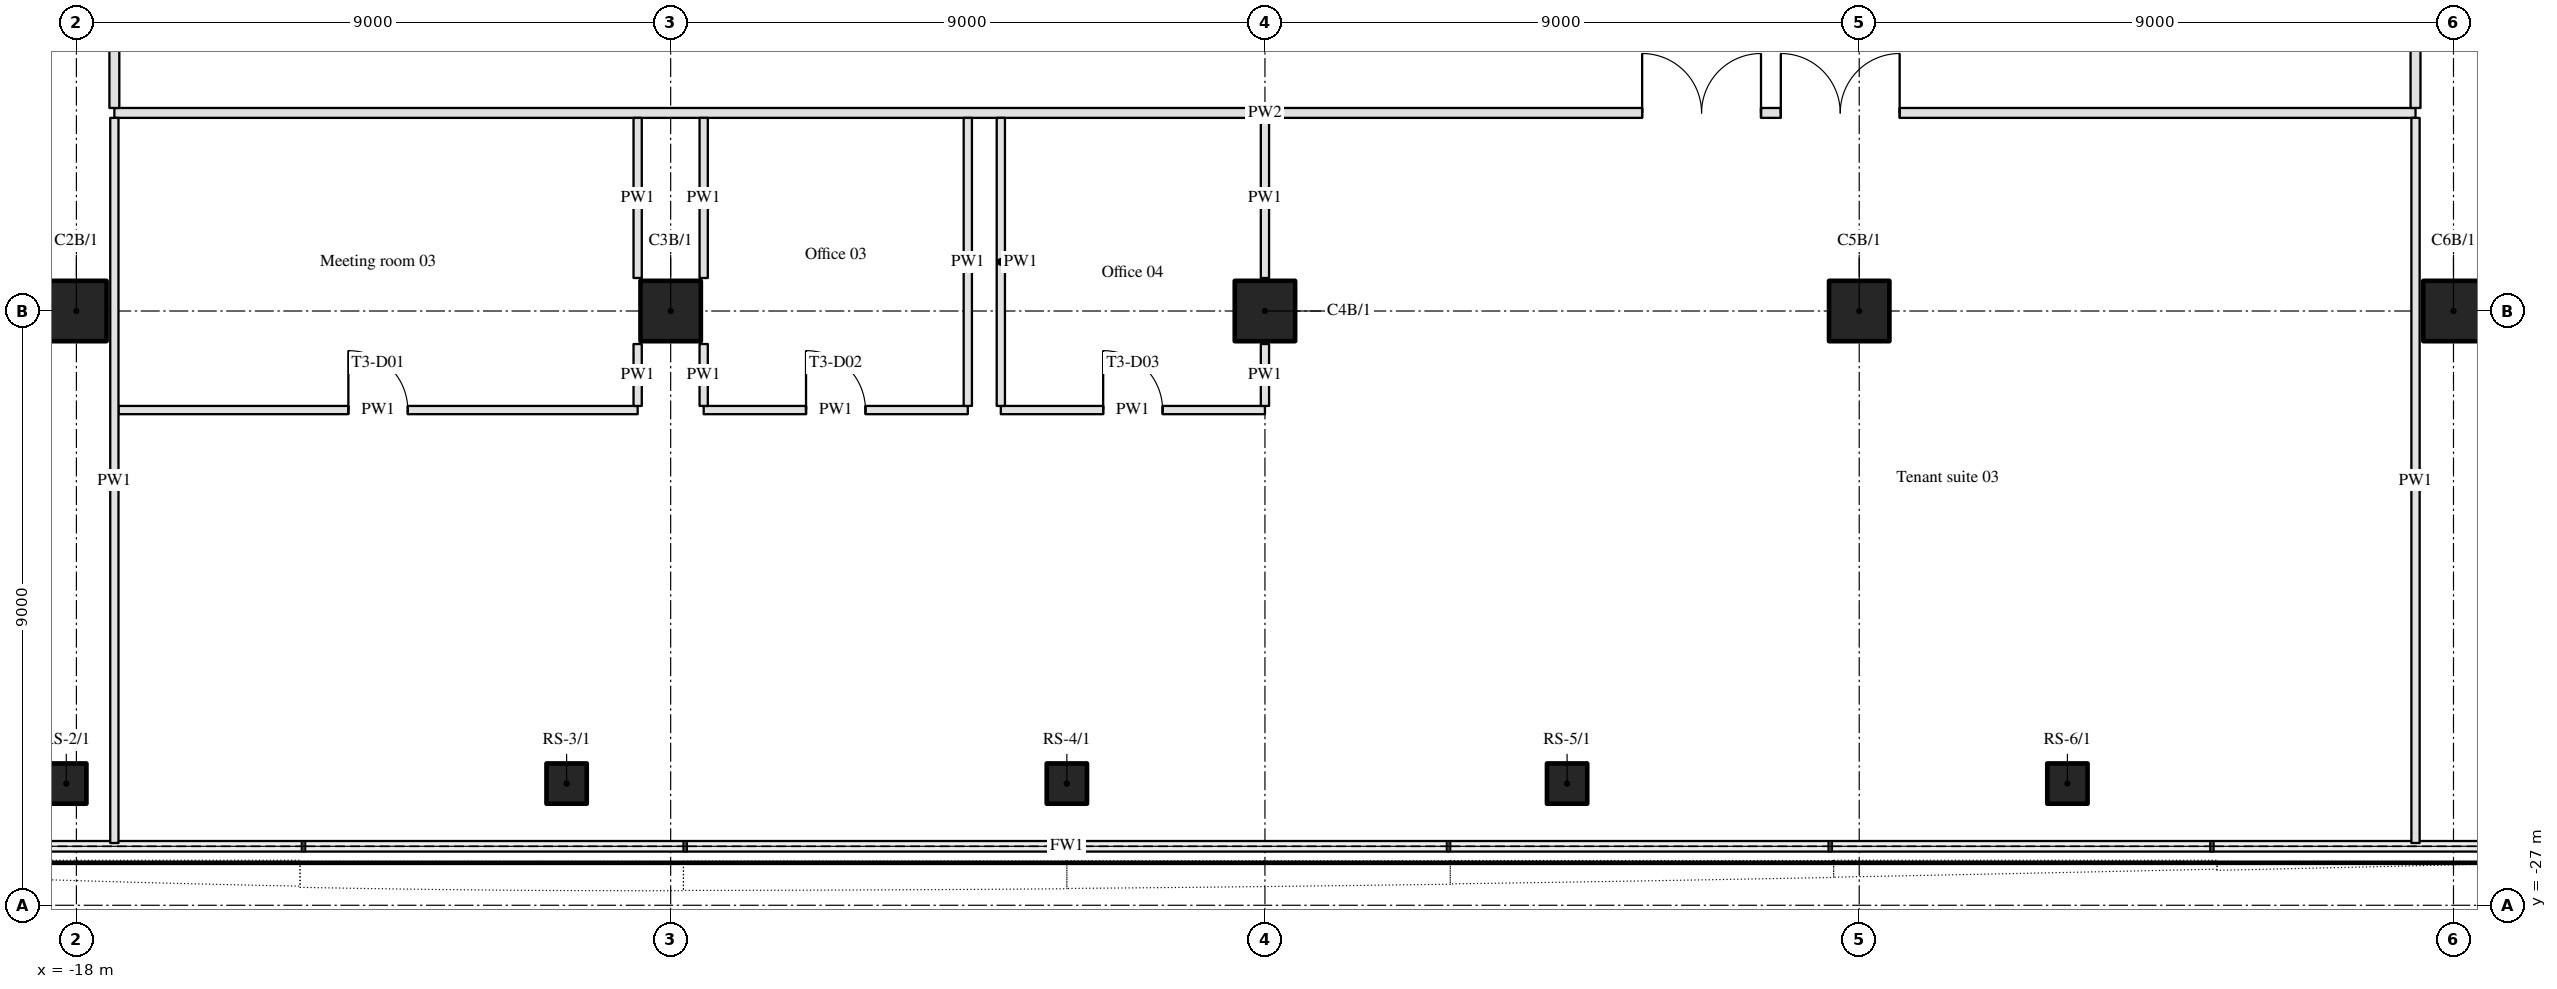
"""IFC4 building model, lengths in metres.
Left out: names, types, materials, properties, quantities, classifications, styles, units other than length and angle.
Written with IfcOpenShell. Run it as: python <this file> out.ifc"""

import sys

from ifc_helpers import new_model, si_unit, direction, frame, frame_2d, origin, origin_2d, place, context, subcontext, project, spatial, rectangle, hollow_circle, extrude, element, fill, save


model = new_model("IFC4")
c1 = context("Model", 3, precision=1e-05, world=origin(), true_north=direction((0.0, 1.0)))
c2 = subcontext(c1, "Body", "Model", "MODEL_VIEW")
j1 = project(units=[si_unit("LENGTHUNIT", "METRE"), si_unit("PLANEANGLEUNIT", "RADIAN")], contexts=[c1])
p1 = place(None, origin())
s1 = spatial("IfcSite", under=j1, at=p1, CompositionType="ELEMENT")
p2 = place(p1, origin())
s2 = spatial("IfcBuilding", under=s1, at=p2, CompositionType="ELEMENT")
p3 = place(p2, frame((0.0, 0.0, 53.7)))
s3 = spatial("IfcBuildingStorey", under=s2, at=p3, CompositionType="ELEMENT", Elevation=53.7)
for number, where, z_axis, x_axis in (
    (1, (-18.0, -18.0, 0.0), (0.0, 0.0, 1.0), (1.0, 0.0, 0.0)),
    (2, (-9.0, -18.0, 0.0), (0.0, 0.0, 1.0), (1.0, 0.0, 0.0)),
    (3, (0.0, -18.0, 0.0), (0.0, 0.0, 1.0), (1.0, 0.0, 0.0)),
    (4, (9.0, -18.0, 0.0), (0.0, 0.0, 1.0), (1.0, 0.0, 0.0)),
    (5, (18.0, -18.0, 0.0), (0.0, 0.0, 1.0), (1.0, 0.0, 0.0)),
):
    element("IfcColumn", number, at=place(p3, frame(where, z_axis=z_axis, x_axis=x_axis)), inside=s3, PredefinedType="COLUMN", context=c2, shape_type="SweptSolid", body=[
        extrude(hollow_circle(Radius=0.457, WallThickness=0.05, at=origin_2d()), origin(), (0.0, 0.0, 1.0), 3.9),
    ])
for number, where, z_axis, x_axis in (
    (6, (-18.153, -25.157, 0.0), (0.0, 0.0, 1.0), (1.0, 0.0, 0.0)),
    (7, (-10.576, -25.157, 0.0), (0.0, 0.0, 1.0), (1.0, 0.0, 0.0)),
    (8, (-3.0, -25.157, 0.0), (0.0, 0.0, 1.0), (1.0, 0.0, 0.0)),
    (9, (4.576, -25.157, 0.0), (0.0, 0.0, 1.0), (1.0, 0.0, 0.0)),
    (10, (12.153, -25.157, 0.0), (0.0, 0.0, 1.0), (1.0, 0.0, 0.0)),
):
    element("IfcColumn", number, at=place(p3, frame(where, z_axis=z_axis, x_axis=x_axis)), inside=s3, PredefinedType="COLUMN", context=c2, shape_type="SweptSolid", body=[
        extrude(hollow_circle(Radius=0.305, WallThickness=0.03, at=origin_2d()), origin(), (0.0, 0.0, 1.0), 3.9),
    ])
p4 = place(p3, frame((-17.363, -19.5, 0.0), z_axis=(0.0, 0.0, 1.0), x_axis=(1.0, 0.0, 0.0)))
e11 = element("IfcWall", 11, at=p4, inside=s3, PredefinedType="PARTITIONING", context=c2, shape_type="SweptSolid", body=[
    extrude(rectangle(XDim=7.863, YDim=0.125, at=frame_2d((3.931, 0.0))), origin(), (0.0, 0.0, 1.0), 2.96),
])
p5 = place(p4, frame((3.481, 0.0, 0.0)))
e12 = element("IfcOpeningElement", 12, at=p5, cuts=e11, PredefinedType="OPENING", context=c2, shape_type="SweptSolid", body=[
    extrude(rectangle(XDim=0.9, YDim=2.1, at=frame_2d((0.45, 1.05))), frame((0.0, 0.073, 0.0), z_axis=(0.0, -1.0, 0.0), x_axis=(1.0, 0.0, 0.0)), (0.0, 0.0, 1.0), 0.145),
])
p6 = place(p3, frame((-8.5, -19.5, 0.0), z_axis=(0.0, 0.0, 1.0), x_axis=(1.0, 0.0, 0.0)))
e13 = element("IfcWall", 13, at=p6, inside=s3, PredefinedType="PARTITIONING", context=c2, shape_type="SweptSolid", body=[
    extrude(rectangle(XDim=4.0, YDim=0.125, at=frame_2d((2.0, 0.0))), origin(), (0.0, 0.0, 1.0), 2.96),
])
p7 = place(p6, frame((1.55, 0.0, 0.0)))
e14 = element("IfcOpeningElement", 14, at=p7, cuts=e13, PredefinedType="OPENING", context=c2, shape_type="SweptSolid", body=[
    extrude(rectangle(XDim=0.9, YDim=2.1, at=frame_2d((0.45, 1.05))), frame((0.0, 0.073, 0.0), z_axis=(0.0, -1.0, 0.0), x_axis=(1.0, 0.0, 0.0)), (0.0, 0.0, 1.0), 0.145),
])
p8 = place(p3, frame((-4.0, -19.5, 0.0), z_axis=(0.0, 0.0, 1.0), x_axis=(1.0, 0.0, 0.0)))
e15 = element("IfcWall", 15, at=p8, inside=s3, PredefinedType="PARTITIONING", context=c2, shape_type="SweptSolid", body=[
    extrude(rectangle(XDim=4.0, YDim=0.125, at=frame_2d((2.0, 0.0))), origin(), (0.0, 0.0, 1.0), 2.96),
])
p9 = place(p8, frame((1.55, 0.0, 0.0)))
e16 = element("IfcOpeningElement", 16, at=p9, cuts=e15, PredefinedType="OPENING", context=c2, shape_type="SweptSolid", body=[
    extrude(rectangle(XDim=0.9, YDim=2.1, at=frame_2d((0.45, 1.05))), frame((0.0, 0.073, 0.0), z_axis=(0.0, -1.0, 0.0), x_axis=(1.0, 0.0, 0.0)), (0.0, 0.0, 1.0), 0.145),
])
p10 = place(p3, frame((-17.425, -15.0, 0.0), z_axis=(0.0, 0.0, 1.0), x_axis=(1.0, 0.0, 0.0)))
e17 = element("IfcWall", 17, at=p10, inside=s3, PredefinedType="PARTITIONING", context=c2, shape_type="SweptSolid", body=[
    extrude(rectangle(XDim=34.85, YDim=0.15, at=frame_2d((17.425, 0.0))), origin(), (0.0, 0.0, 1.0), 2.96),
])
p11 = place(p10, frame((25.238, 0.0, 0.0)))
e18 = element("IfcOpeningElement", 18, at=p11, cuts=e17, PredefinedType="OPENING", context=c2, shape_type="SweptSolid", body=[
    extrude(rectangle(XDim=1.8, YDim=2.1, at=frame_2d((0.9, 1.05))), frame((0.0, 0.085, 0.0), z_axis=(0.0, -1.0, 0.0), x_axis=(1.0, 0.0, 0.0)), (0.0, 0.0, 1.0), 0.17),
])
p12 = place(p10, frame((23.137, 0.0, 0.0)))
e19 = element("IfcOpeningElement", 19, at=p12, cuts=e17, PredefinedType="OPENING", context=c2, shape_type="SweptSolid", body=[
    extrude(rectangle(XDim=1.8, YDim=2.1, at=frame_2d((0.9, 1.05))), frame((0.0, 0.085, 0.0), z_axis=(0.0, -1.0, 0.0), x_axis=(1.0, 0.0, 0.0)), (0.0, 0.0, 1.0), 0.17),
])
p13 = place(p3, frame((-17.425, -26.057, 0.0), z_axis=(0.0, 0.0, 1.0), x_axis=(0.0, 1.0, 0.0)))
e20 = element("IfcWall", 20, at=p13, inside=s3, PredefinedType="PARTITIONING", context=c2, shape_type="SweptSolid", body=[
    extrude(rectangle(XDim=10.982, YDim=0.125, at=frame_2d((5.491, 0.0))), origin(), (0.0, 0.0, 1.0), 2.96),
])
p14 = place(p3, frame((-17.425, 5.925, 0.0), z_axis=(0.0, 0.0, 1.0), x_axis=(0.0, -1.0, 0.0)))
e21 = element("IfcWall", 21, at=p14, inside=s3, PredefinedType="PARTITIONING", context=c2, shape_type="SweptSolid", body=[
    extrude(rectangle(XDim=20.85, YDim=0.15, at=frame_2d((10.425, 0.0))), origin(), (0.0, 0.0, 1.0), 2.96),
])
p15 = place(p14, frame((16.988, 0.0, 0.0)))
e22 = element("IfcOpeningElement", 22, at=p15, cuts=e21, PredefinedType="OPENING", context=c2, shape_type="SweptSolid", body=[
    extrude(rectangle(XDim=1.8, YDim=2.1, at=frame_2d((0.9, 1.05))), frame((0.0, 0.085, 0.0), z_axis=(0.0, -1.0, 0.0), x_axis=(1.0, 0.0, 0.0)), (0.0, 0.0, 1.0), 0.17),
])
p16 = place(p14, frame((6.562, 0.0, 0.0)))
e23 = element("IfcOpeningElement", 23, at=p16, cuts=e21, PredefinedType="OPENING", context=c2, shape_type="SweptSolid", body=[
    extrude(rectangle(XDim=1.8, YDim=2.1, at=frame_2d((0.9, 1.05))), frame((0.0, 0.085, 0.0), z_axis=(0.0, -1.0, 0.0), x_axis=(1.0, 0.0, 0.0)), (0.0, 0.0, 1.0), 0.17),
])
p17 = place(p14, frame((8.663, 0.0, 0.0)))
e24 = element("IfcOpeningElement", 24, at=p17, cuts=e21, PredefinedType="OPENING", context=c2, shape_type="SweptSolid", body=[
    extrude(rectangle(XDim=1.8, YDim=2.1, at=frame_2d((0.9, 1.05))), frame((0.0, 0.085, 0.0), z_axis=(0.0, -1.0, 0.0), x_axis=(1.0, 0.0, 0.0)), (0.0, 0.0, 1.0), 0.17),
])
p18 = place(p3, frame((-9.5, -19.438, 0.0), z_axis=(0.0, 0.0, 1.0), x_axis=(0.0, 1.0, 0.0)))
e25 = element("IfcWall", 25, at=p18, inside=s3, PredefinedType="PARTITIONING", context=c2, shape_type="SweptSolid", body=[
    extrude(rectangle(XDim=0.938, YDim=0.125, at=frame_2d((0.469, 0.0))), origin(), (0.0, 0.0, 1.0), 2.96),
])
p19 = place(p3, frame((-9.5, -17.5, 0.0), z_axis=(0.0, 0.0, 1.0), x_axis=(0.0, 1.0, 0.0)))
e26 = element("IfcWall", 26, at=p19, inside=s3, PredefinedType="PARTITIONING", context=c2, shape_type="SweptSolid", body=[
    extrude(rectangle(XDim=2.425, YDim=0.125, at=frame_2d((1.212, 0.0))), origin(), (0.0, 0.0, 1.0), 2.96),
])
p20 = place(p3, frame((-8.5, -19.438, 0.0), z_axis=(0.0, 0.0, 1.0), x_axis=(0.0, 1.0, 0.0)))
e27 = element("IfcWall", 27, at=p20, inside=s3, PredefinedType="PARTITIONING", context=c2, shape_type="SweptSolid", body=[
    extrude(rectangle(XDim=0.938, YDim=0.125, at=frame_2d((0.469, 0.0))), origin(), (0.0, 0.0, 1.0), 2.96),
])
p21 = place(p3, frame((-8.5, -17.5, 0.0), z_axis=(0.0, 0.0, 1.0), x_axis=(0.0, 1.0, 0.0)))
e28 = element("IfcWall", 28, at=p21, inside=s3, PredefinedType="PARTITIONING", context=c2, shape_type="SweptSolid", body=[
    extrude(rectangle(XDim=2.425, YDim=0.125, at=frame_2d((1.212, 0.0))), origin(), (0.0, 0.0, 1.0), 2.96),
])
for number, where, z_axis, x_axis in (
    (29, (-4.5, -19.438, 0.0), (0.0, 0.0, 1.0), (0.0, 1.0, 0.0)),
    (30, (-4.0, -19.438, 0.0), (0.0, 0.0, 1.0), (0.0, 1.0, 0.0)),
):
    element("IfcWall", number, at=place(p3, frame(where, z_axis=z_axis, x_axis=x_axis)), inside=s3, PredefinedType="PARTITIONING", context=c2, shape_type="SweptSolid", body=[
        extrude(rectangle(XDim=4.363, YDim=0.125, at=frame_2d((2.181, 0.0))), origin(), (0.0, 0.0, 1.0), 2.96),
    ])
p22 = place(p3, frame((0.0, -19.438, 0.0), z_axis=(0.0, 0.0, 1.0), x_axis=(0.0, 1.0, 0.0)))
e31 = element("IfcWall", 31, at=p22, inside=s3, PredefinedType="PARTITIONING", context=c2, shape_type="SweptSolid", body=[
    extrude(rectangle(XDim=0.938, YDim=0.125, at=frame_2d((0.469, 0.0))), origin(), (0.0, 0.0, 1.0), 2.96),
])
p23 = place(p3, frame((0.0, -17.5, 0.0), z_axis=(0.0, 0.0, 1.0), x_axis=(0.0, 1.0, 0.0)))
e32 = element("IfcWall", 32, at=p23, inside=s3, PredefinedType="PARTITIONING", context=c2, shape_type="SweptSolid", body=[
    extrude(rectangle(XDim=2.425, YDim=0.125, at=frame_2d((1.212, 0.0))), origin(), (0.0, 0.0, 1.0), 2.96),
])
p24 = place(p3, frame((17.425, -26.057, 0.0), z_axis=(0.0, 0.0, 1.0), x_axis=(0.0, 1.0, 0.0)))
e33 = element("IfcWall", 33, at=p24, inside=s3, PredefinedType="PARTITIONING", context=c2, shape_type="SweptSolid", body=[
    extrude(rectangle(XDim=10.982, YDim=0.125, at=frame_2d((5.491, 0.0))), origin(), (0.0, 0.0, 1.0), 2.96),
])
p25 = place(p3, frame((17.425, -14.925, 0.0), z_axis=(0.0, 0.0, 1.0), x_axis=(0.0, 1.0, 0.0)))
e34 = element("IfcWall", 34, at=p25, inside=s3, PredefinedType="PARTITIONING", context=c2, shape_type="SweptSolid", body=[
    extrude(rectangle(XDim=20.85, YDim=0.15, at=frame_2d((10.425, 0.0))), origin(), (0.0, 0.0, 1.0), 2.96),
])
p26 = place(p25, frame((6.562, 0.0, 0.0)))
e35 = element("IfcOpeningElement", 35, at=p26, cuts=e34, PredefinedType="OPENING", context=c2, shape_type="SweptSolid", body=[
    extrude(rectangle(XDim=1.8, YDim=2.1, at=frame_2d((0.9, 1.05))), frame((0.0, 0.085, 0.0), z_axis=(0.0, -1.0, 0.0), x_axis=(1.0, 0.0, 0.0)), (0.0, 0.0, 1.0), 0.17),
])
p27 = place(p25, frame((8.663, 0.0, 0.0)))
e36 = element("IfcOpeningElement", 36, at=p27, cuts=e34, PredefinedType="OPENING", context=c2, shape_type="SweptSolid", body=[
    extrude(rectangle(XDim=1.8, YDim=2.1, at=frame_2d((0.9, 1.05))), frame((0.0, 0.085, 0.0), z_axis=(0.0, -1.0, 0.0), x_axis=(1.0, 0.0, 0.0)), (0.0, 0.0, 1.0), 0.17),
])
p28 = place(p25, frame((16.988, 0.0, 0.0)))
e37 = element("IfcOpeningElement", 37, at=p28, cuts=e34, PredefinedType="OPENING", context=c2, shape_type="SweptSolid", body=[
    extrude(rectangle(XDim=1.8, YDim=2.1, at=frame_2d((0.9, 1.05))), frame((0.0, 0.085, 0.0), z_axis=(0.0, -1.0, 0.0), x_axis=(1.0, 0.0, 0.0)), (0.0, 0.0, 1.0), 0.17),
])
p29 = place(p11, origin())
e38 = element("IfcDoor", 38, at=p29, inside=s3, OperationType="DOUBLE_DOOR_SINGLE_SWING", PredefinedType="DOOR", context=c2, shape_type="SweptSolid", body=[
    extrude(rectangle(XDim=1.8, YDim=2.1, at=frame_2d((0.9, 1.05))), frame((0.0, 0.025, 0.0), z_axis=(0.0, -1.0, 0.0), x_axis=(1.0, 0.0, 0.0)), (0.0, 0.0, 1.0), 0.05),
])
fill(e18, e38)
p30 = place(p12, origin())
e39 = element("IfcDoor", 39, at=p30, inside=s3, OperationType="DOUBLE_DOOR_SINGLE_SWING", PredefinedType="DOOR", context=c2, shape_type="SweptSolid", body=[
    extrude(rectangle(XDim=1.8, YDim=2.1, at=frame_2d((0.9, 1.05))), frame((0.0, 0.025, 0.0), z_axis=(0.0, -1.0, 0.0), x_axis=(1.0, 0.0, 0.0)), (0.0, 0.0, 1.0), 0.05),
])
fill(e19, e39)
p31 = place(p5, origin())
e40 = element("IfcDoor", 40, at=p31, inside=s3, OperationType="SINGLE_SWING_LEFT", PredefinedType="DOOR", context=c2, shape_type="SweptSolid", body=[
    extrude(rectangle(XDim=0.9, YDim=2.1, at=frame_2d((0.45, 1.05))), frame((0.0, 0.025, 0.0), z_axis=(0.0, -1.0, 0.0), x_axis=(1.0, 0.0, 0.0)), (0.0, 0.0, 1.0), 0.05),
])
fill(e12, e40)
p32 = place(p7, origin())
e41 = element("IfcDoor", 41, at=p32, inside=s3, OperationType="SINGLE_SWING_LEFT", PredefinedType="DOOR", context=c2, shape_type="SweptSolid", body=[
    extrude(rectangle(XDim=0.9, YDim=2.1, at=frame_2d((0.45, 1.05))), frame((0.0, 0.025, 0.0), z_axis=(0.0, -1.0, 0.0), x_axis=(1.0, 0.0, 0.0)), (0.0, 0.0, 1.0), 0.05),
])
fill(e14, e41)
p33 = place(p9, origin())
e42 = element("IfcDoor", 42, at=p33, inside=s3, OperationType="SINGLE_SWING_LEFT", PredefinedType="DOOR", context=c2, shape_type="SweptSolid", body=[
    extrude(rectangle(XDim=0.9, YDim=2.1, at=frame_2d((0.45, 1.05))), frame((0.0, 0.025, 0.0), z_axis=(0.0, -1.0, 0.0), x_axis=(1.0, 0.0, 0.0)), (0.0, 0.0, 1.0), 0.05),
])
fill(e16, e42)
save(model, sys.argv[1])
